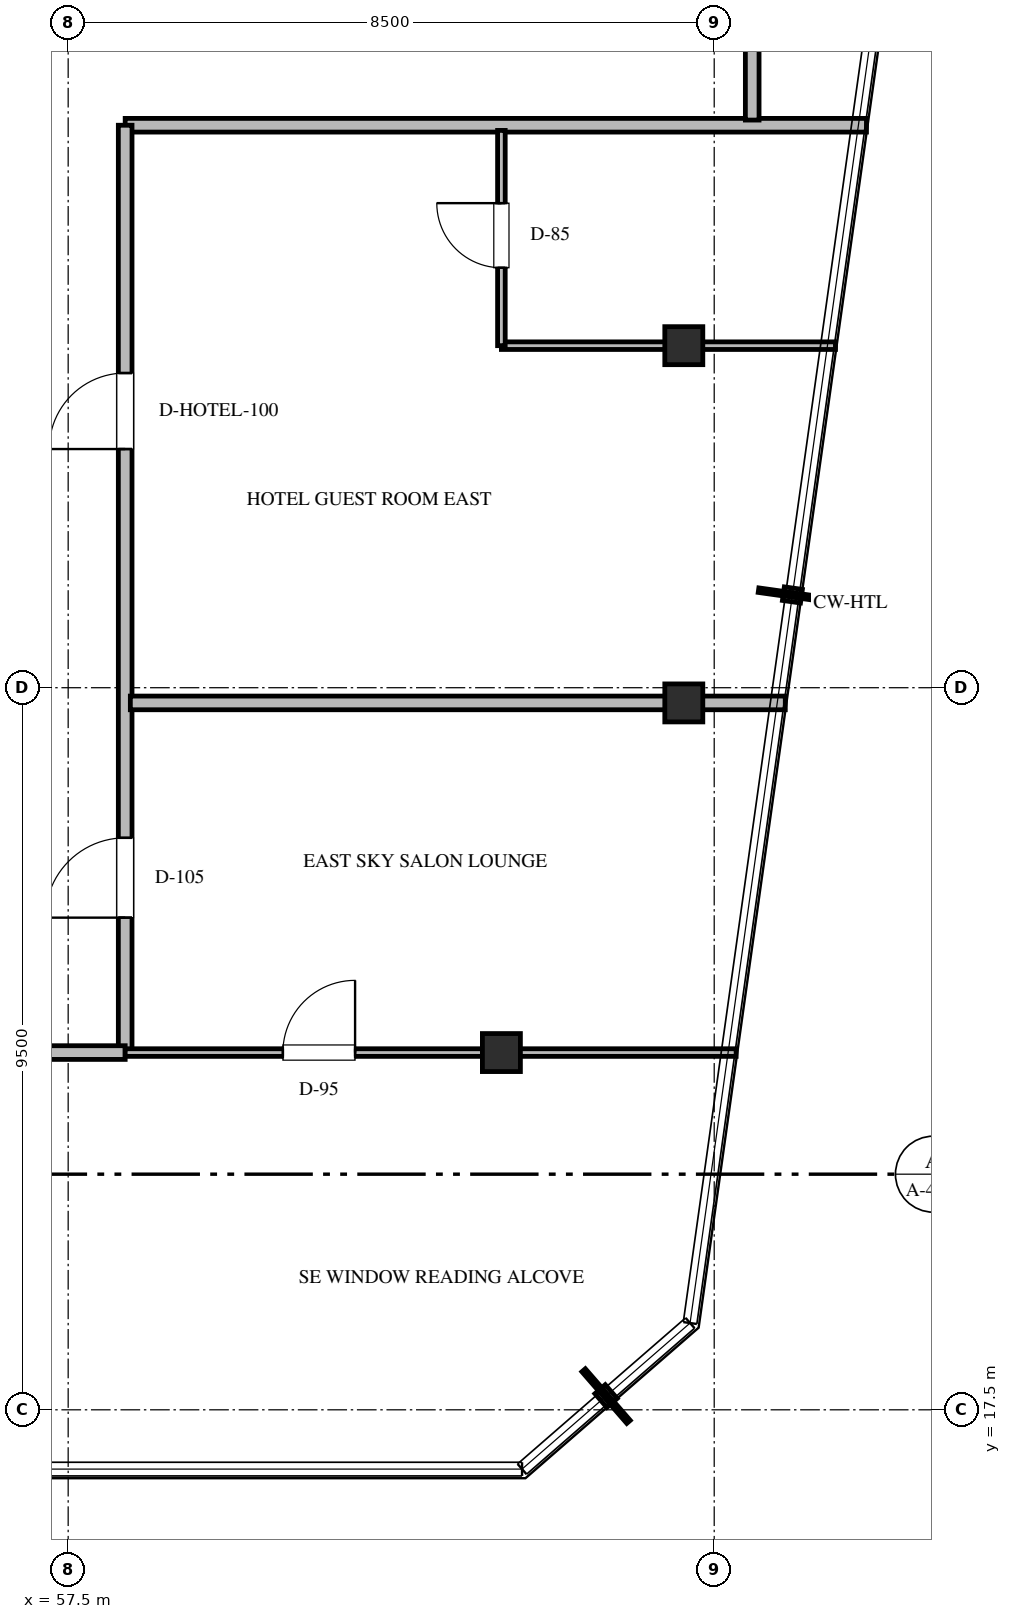
"""IFC4 building model, lengths in metres.
Left out: names, types, materials, properties, quantities, classifications, styles, units other than length and angle.
Written with IfcOpenShell. Run it as: python <this file> out.ifc"""

import sys

from ifc_helpers import new_model, si_unit, direction, frame, frame_2d, origin, origin_2d, place, context, subcontext, project, spatial, rectangle, hollow_rectangle, extrude, element, fill, save


model = new_model("IFC4")
c1 = context("Model", 3, precision=1e-05, world=origin(), true_north=direction((0.0, 1.0)))
c2 = subcontext(c1, "Body", "Model", "MODEL_VIEW")
j1 = project(units=[si_unit("LENGTHUNIT", "METRE"), si_unit("PLANEANGLEUNIT", "RADIAN")], contexts=[c1])
p1 = place(None, origin())
s1 = spatial("IfcSite", under=j1, at=p1, CompositionType="ELEMENT")
p2 = place(p1, origin())
s2 = spatial("IfcBuilding", under=s1, at=p2, CompositionType="ELEMENT")
p3 = place(p2, frame((0.0, 0.0, 231.0)))
s3 = spatial("IfcBuildingStorey", under=s2, at=p3, CompositionType="ELEMENT", Elevation=231.0)
for number, where, z_axis, x_axis in (
    (1, (65.6, 31.5, 0.0), (0.0, 0.0, 1.0), (1.0, 0.0, 0.0)),
    (2, (65.6, 26.8, 0.0), (0.0, 0.0, 1.0), (1.0, 0.0, 0.0)),
    (3, (63.2, 22.2, 0.0), (0.0, 0.0, 1.0), (1.0, 0.0, 0.0)),
):
    element("IfcColumn", number, at=place(p3, frame(where, z_axis=z_axis, x_axis=x_axis)), inside=s3, PredefinedType="COLUMN", context=c2, shape_type="SweptSolid", body=[
        extrude(hollow_rectangle(XDim=0.5, YDim=0.5, WallThickness=0.02, at=origin_2d()), origin(), (0.0, 0.0, 1.0), 3.6),
    ])
p4 = place(p3, frame((58.25, 34.4, 0.0), z_axis=(0.0, 0.0, 1.0), x_axis=(1.0, 0.0, 0.0)))
e4 = element("IfcWall", 4, at=p4, inside=s3, PredefinedType="STANDARD", context=c2, shape_type="SweptSolid", body=[
    extrude(rectangle(XDim=9.753, YDim=0.18, at=frame_2d((4.877, 0.0))), origin(), (0.0, 0.0, 1.0), 3.36),
])
p5 = place(p3, frame((66.5, 34.468, 0.0), z_axis=(0.0, 0.0, 1.0), x_axis=(0.0, 1.0, 0.0)))
e5 = element("IfcWall", 5, at=p5, inside=s3, PredefinedType="STANDARD", context=c2, shape_type="SweptSolid", body=[
    extrude(rectangle(XDim=3.582, YDim=0.18, at=frame_2d((1.791, 0.0))), origin(), (0.0, 0.0, 1.0), 2.664),
])
p6 = place(p3, frame((58.25, 22.2, 0.0), z_axis=(0.0, 0.0, 1.0), x_axis=(0.0, 1.0, 0.0)))
e6 = element("IfcWall", 6, at=p6, inside=s3, PredefinedType="STANDARD", context=c2, shape_type="SweptSolid", body=[
    extrude(rectangle(XDim=12.2, YDim=0.18, at=frame_2d((6.1, 0.0))), origin(), (0.0, 0.0, 1.0), 2.664),
])
p7 = place(p6, frame((1.775, 0.0, 0.0)))
e7 = element("IfcOpeningElement", 7, at=p7, cuts=e6, PredefinedType="OPENING", context=c2, shape_type="SweptSolid", body=[
    extrude(rectangle(XDim=1.05, YDim=2.2, at=frame_2d((0.525, 1.1))), frame((0.0, 0.1, 0.0), z_axis=(0.0, -1.0, 0.0), x_axis=(1.0, 0.0, 0.0)), (0.0, 0.0, 1.0), 0.2),
])
p8 = place(p6, frame((7.94, 0.0, 0.0)))
e8 = element("IfcOpeningElement", 8, at=p8, cuts=e6, PredefinedType="OPENING", context=c2, shape_type="SweptSolid", body=[
    extrude(rectangle(XDim=1.0, YDim=2.15, at=frame_2d((0.5, 1.075))), frame((0.0, 0.1, 0.0), z_axis=(0.0, -1.0, 0.0), x_axis=(1.0, 0.0, 0.0)), (0.0, 0.0, 1.0), 0.2),
])
p9 = place(p3, frame((56.0, 22.2, 0.0), z_axis=(0.0, 0.0, 1.0), x_axis=(1.0, 0.0, 0.0)))
e9 = element("IfcWall", 9, at=p9, inside=s3, PredefinedType="STANDARD", context=c2, shape_type="SweptSolid", body=[
    extrude(rectangle(XDim=2.25, YDim=0.18, at=frame_2d((1.125, 0.0))), origin(), (0.0, 0.0, 1.0), 2.664),
])
p10 = place(p3, frame((58.318, 26.8, 0.0), z_axis=(0.0, 0.0, 1.0), x_axis=(1.0, 0.0, 0.0)))
e10 = element("IfcWall", 10, at=p10, inside=s3, PredefinedType="STANDARD", context=c2, shape_type="SweptSolid", body=[
    extrude(rectangle(XDim=8.617, YDim=0.18, at=frame_2d((4.309, 0.0))), origin(), (0.0, 0.0, 1.0), 2.664),
])
p11 = place(p3, frame((58.25, 22.2, 0.0), z_axis=(0.0, 0.0, 1.0), x_axis=(1.0, 0.0, 0.0)))
e11 = element("IfcWall", 11, at=p11, inside=s3, PredefinedType="PARTITIONING", context=c2, shape_type="SweptSolid", body=[
    extrude(rectangle(XDim=8.039, YDim=0.1, at=frame_2d((4.019, 0.0))), origin(), (0.0, 0.0, 1.0), 2.664),
])
p12 = place(p11, frame((2.075, 0.0, 0.0)))
e12 = element("IfcOpeningElement", 12, at=p12, cuts=e11, PredefinedType="OPENING", context=c2, shape_type="SweptSolid", body=[
    extrude(rectangle(XDim=0.95, YDim=2.15, at=frame_2d((0.475, 1.075))), frame((0.0, 0.06, 0.0), z_axis=(0.0, -1.0, 0.0), x_axis=(1.0, 0.0, 0.0)), (0.0, 0.0, 1.0), 0.12),
])
p13 = place(p3, frame((63.2, 31.5, 0.0), z_axis=(0.0, 0.0, 1.0), x_axis=(1.0, 0.0, 0.0)))
e13 = element("IfcWall", 13, at=p13, inside=s3, PredefinedType="PARTITIONING", context=c2, shape_type="SweptSolid", body=[
    extrude(rectangle(XDim=4.396, YDim=0.1, at=frame_2d((2.198, 0.0))), origin(), (0.0, 0.0, 1.0), 2.664),
])
p14 = place(p3, frame((63.2, 31.5, 0.0), z_axis=(0.0, 0.0, 1.0), x_axis=(0.0, 1.0, 0.0)))
e14 = element("IfcWall", 14, at=p14, inside=s3, PredefinedType="PARTITIONING", context=c2, shape_type="SweptSolid", body=[
    extrude(rectangle(XDim=2.832, YDim=0.1, at=frame_2d((1.416, 0.0))), origin(), (0.0, 0.0, 1.0), 2.664),
])
p15 = place(p14, frame((1.025, 0.0, 0.0)))
e15 = element("IfcOpeningElement", 15, at=p15, cuts=e14, PredefinedType="OPENING", context=c2, shape_type="SweptSolid", body=[
    extrude(rectangle(XDim=0.85, YDim=2.1, at=frame_2d((0.425, 1.05))), frame((0.0, 0.06, 0.0), z_axis=(0.0, -1.0, 0.0), x_axis=(1.0, 0.0, 0.0)), (0.0, 0.0, 1.0), 0.12),
])
p16 = place(p7, origin())
e16 = element("IfcDoor", 16, at=p16, inside=s3, OperationType="SINGLE_SWING_LEFT", PredefinedType="DOOR", context=c2, shape_type="SweptSolid", body=[
    extrude(rectangle(XDim=1.05, YDim=2.2, at=frame_2d((0.525, 1.1))), frame((0.0, 0.025, 0.0), z_axis=(0.0, -1.0, 0.0), x_axis=(1.0, 0.0, 0.0)), (0.0, 0.0, 1.0), 0.05),
])
fill(e7, e16)
p17 = place(p12, origin())
e17 = element("IfcDoor", 17, at=p17, inside=s3, OperationType="SINGLE_SWING_RIGHT", PredefinedType="DOOR", context=c2, shape_type="SweptSolid", body=[
    extrude(rectangle(XDim=0.95, YDim=2.15, at=frame_2d((0.475, 1.075))), frame((0.0, 0.025, 0.0), z_axis=(0.0, -1.0, 0.0), x_axis=(1.0, 0.0, 0.0)), (0.0, 0.0, 1.0), 0.05),
])
fill(e12, e17)
p18 = place(p8, origin())
e18 = element("IfcDoor", 18, at=p18, inside=s3, OperationType="SINGLE_SWING_LEFT", PredefinedType="DOOR", context=c2, shape_type="SweptSolid", body=[
    extrude(rectangle(XDim=1.0, YDim=2.15, at=frame_2d((0.5, 1.075))), frame((0.0, 0.025, 0.0), z_axis=(0.0, -1.0, 0.0), x_axis=(1.0, 0.0, 0.0)), (0.0, 0.0, 1.0), 0.05),
])
fill(e8, e18)
p19 = place(p15, origin())
e19 = element("IfcDoor", 19, at=p19, inside=s3, OperationType="SINGLE_SWING_RIGHT", PredefinedType="DOOR", context=c2, shape_type="SweptSolid", body=[
    extrude(rectangle(XDim=0.85, YDim=2.1, at=frame_2d((0.425, 1.05))), frame((0.0, 0.025, 0.0), z_axis=(0.0, -1.0, 0.0), x_axis=(1.0, 0.0, 0.0)), (0.0, 0.0, 1.0), 0.05),
])
fill(e15, e19)
save(model, sys.argv[1])
